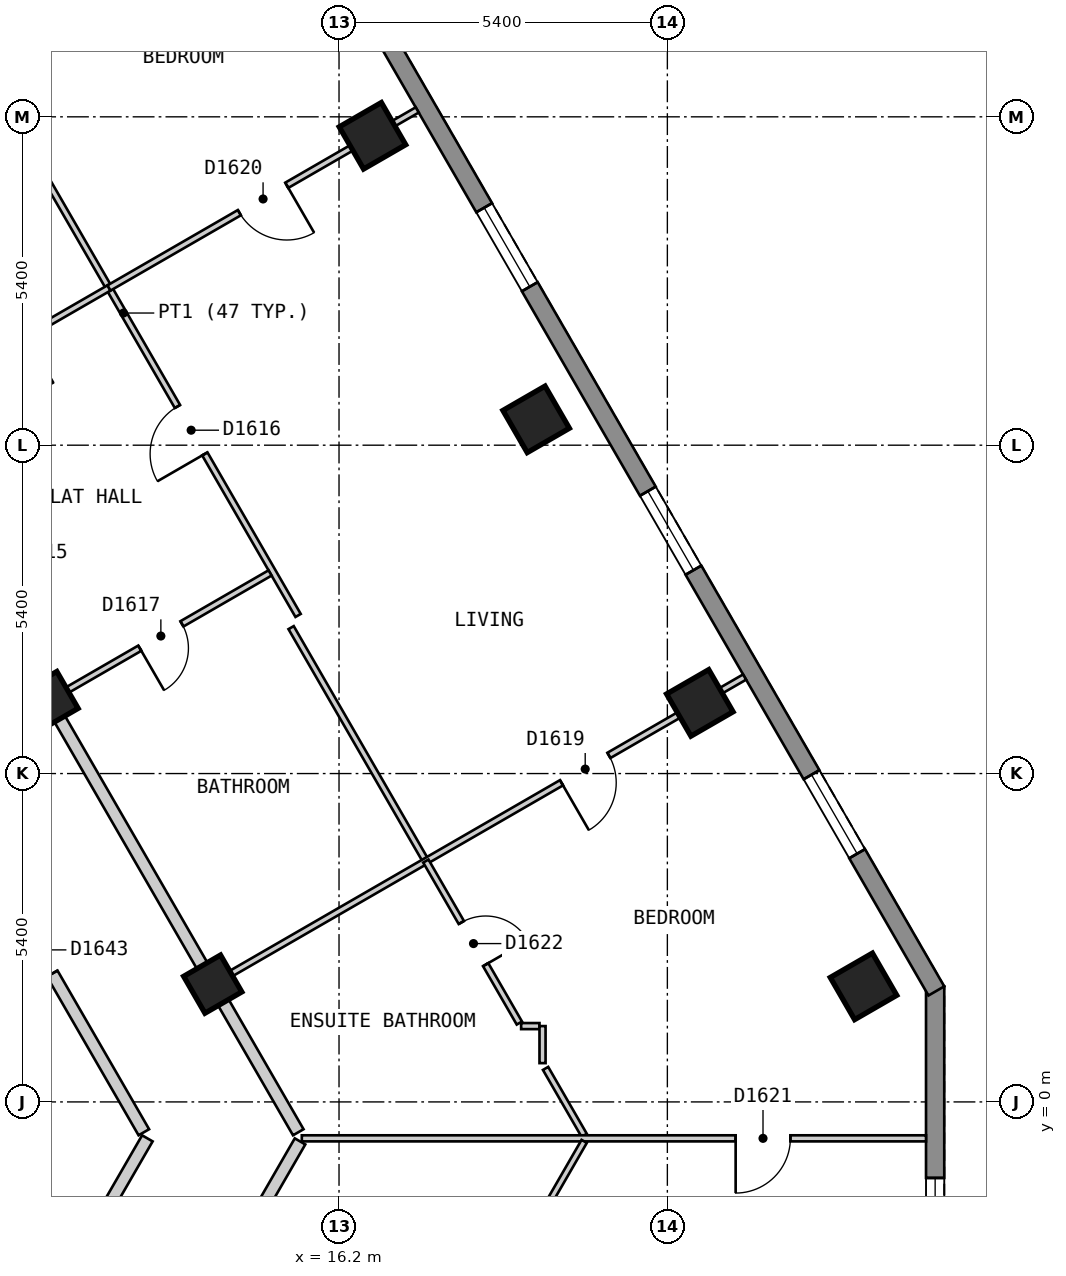
"""IFC4 building model, lengths in metres.
Left out: names, types, materials, properties, quantities, classifications, styles, units other than length and angle.
Written with IfcOpenShell. Run it as: python <this file> out.ifc"""

import sys

from ifc_helpers import new_model, si_unit, direction, frame, frame_2d, origin, origin_2d, place, context, subcontext, project, spatial, polyline, rectangle, outline, extrude, element, fill, save


model = new_model("IFC4")
c1 = context("Model", 3, precision=1e-05, world=origin(), true_north=direction((0.0, 1.0)))
c2 = subcontext(c1, "Body", "Model", "MODEL_VIEW")
j1 = project(units=[si_unit("LENGTHUNIT", "METRE"), si_unit("PLANEANGLEUNIT", "RADIAN")], contexts=[c1])
p1 = place(None, origin())
s1 = spatial("IfcSite", under=j1, at=p1, CompositionType="ELEMENT")
p2 = place(p1, origin())
s2 = spatial("IfcBuilding", under=s1, at=p2, CompositionType="ELEMENT")
p3 = place(p2, frame((0.0, 0.0, 163.2)))
s3 = spatial("IfcBuildingStorey", under=s2, at=p3, CompositionType="ELEMENT", Elevation=163.2)
for number, where, z_axis, x_axis in (
    (1, (24.826, 1.9, 0.0), (0.0, 0.0, 1.0), (-0.5, 0.866, 0.0)),
    (2, (22.134, 6.562, 0.0), (0.0, 0.0, 1.0), (-0.5, 0.866, 0.0)),
    (3, (19.442, 11.225, 0.0), (0.0, 0.0, 1.0), (-0.5, 0.866, 0.0)),
    (4, (16.75, 15.888, 0.0), (0.0, 0.0, 1.0), (-0.5, 0.866, 0.0)),
):
    element("IfcColumn", number, at=place(p3, frame(where, z_axis=z_axis, x_axis=x_axis)), inside=s3, PredefinedType="COLUMN", context=c2, shape_type="SweptSolid", body=[
        extrude(rectangle(XDim=0.8, YDim=0.8, at=origin_2d()), origin(), (0.0, 0.0, 1.0), 3.0),
    ])
for number, where, z_axis, x_axis in (
    (5, (14.123, 1.937, 0.0), (0.0, 0.0, 1.0), (-0.5, 0.866, 0.0)),
    (6, (11.431, 6.6, 0.0), (0.0, 0.0, 1.0), (-0.5, 0.866, 0.0)),
):
    element("IfcColumn", number, at=place(p3, frame(where, z_axis=z_axis, x_axis=x_axis)), inside=s3, PredefinedType="COLUMN", context=c2, shape_type="SweptSolid", body=[
        extrude(rectangle(XDim=0.7, YDim=0.7, at=origin_2d()), origin(), (0.0, 0.0, 1.0), 3.0),
    ])
p4 = place(p3, frame((26.004, -3.1, 0.0), z_axis=(0.0, 0.0, 1.0), x_axis=(0.0, 1.0, 0.0)))
e7 = element("IfcWall", 7, at=p4, inside=s3, PredefinedType="SOLIDWALL", context=c2, shape_type="SweptSolid", body=[
    extrude(outline(polyline([(0.0, -0.15), (5.0, -0.15), (4.92, 0.15), (0.08, 0.15), (0.0, -0.15)])), origin(), (0.0, 0.0, 1.0), 2.7),
])
p5 = place(p4, frame((0.65, 0.0, 0.15)))
e8 = element("IfcOpeningElement", 8, at=p5, cuts=e7, PredefinedType="OPENING", context=c2, shape_type="SweptSolid", body=[
    extrude(rectangle(XDim=1.2, YDim=2.1, at=frame_2d((0.6, 1.05))), frame((0.0, 0.16, 0.0), z_axis=(0.0, -1.0, 0.0), x_axis=(1.0, 0.0, 0.0)), (0.0, 0.0, 1.0), 0.32),
])
p6 = place(p3, frame((26.024, 1.825, 0.0), z_axis=(0.0, 0.0, 1.0), x_axis=(-0.500010537973, 0.866019319597, 0.0)))
e9 = element("IfcWall", 9, at=p6, inside=s3, PredefinedType="SOLIDWALL", context=c2, shape_type="SweptSolid", body=[
    extrude(outline(polyline([(0.0, -0.15), (22.863, -0.15), (22.783, 0.15), (0.08, 0.15), (0.0, -0.15)])), origin(), (0.0, 0.0, 1.0), 2.7),
])
p7 = place(p6, frame((2.606, 0.0, 0.15)))
e10 = element("IfcOpeningElement", 10, at=p7, cuts=e9, PredefinedType="OPENING", context=c2, shape_type="SweptSolid", body=[
    extrude(rectangle(XDim=1.5, YDim=2.1, at=frame_2d((0.75, 1.05))), frame((0.0, 0.16, 0.0), z_axis=(0.0, -1.0, 0.0), x_axis=(1.0, 0.0, 0.0)), (0.0, 0.0, 1.0), 0.32),
])
p8 = place(p6, frame((7.99, 0.0, 0.15)))
e11 = element("IfcOpeningElement", 11, at=p8, cuts=e9, PredefinedType="OPENING", context=c2, shape_type="SweptSolid", body=[
    extrude(rectangle(XDim=1.5, YDim=2.1, at=frame_2d((0.75, 1.05))), frame((0.0, 0.16, 0.0), z_axis=(0.0, -1.0, 0.0), x_axis=(1.0, 0.0, 0.0)), (0.0, 0.0, 1.0), 0.32),
])
p9 = place(p6, frame((13.373, 0.0, 0.15)))
e12 = element("IfcOpeningElement", 12, at=p9, cuts=e9, PredefinedType="OPENING", context=c2, shape_type="SweptSolid", body=[
    extrude(rectangle(XDim=1.5, YDim=2.1, at=frame_2d((0.75, 1.05))), frame((0.0, 0.16, 0.0), z_axis=(0.0, -1.0, 0.0), x_axis=(1.0, 0.0, 0.0)), (0.0, 0.0, 1.0), 0.32),
])
p10 = place(p6, frame((18.758, 0.0, 0.15)))
e13 = element("IfcOpeningElement", 13, at=p10, cuts=e9, PredefinedType="OPENING", context=c2, shape_type="SweptSolid", body=[
    extrude(rectangle(XDim=1.5, YDim=2.1, at=frame_2d((0.75, 1.05))), frame((0.0, 0.16, 0.0), z_axis=(0.0, -1.0, 0.0), x_axis=(1.0, 0.0, 0.0)), (0.0, 0.0, 1.0), 0.32),
])
p11 = place(p3, frame((9.526, 5.5, 0.0), z_axis=(0.0, 0.0, 1.0), x_axis=(0.500062092869, -0.865989551482, 0.0)))
e14 = element("IfcWall", 14, at=p11, inside=s3, PredefinedType="PARTITIONING", context=c2, shape_type="SweptSolid", body=[
    extrude(rectangle(XDim=6.927, YDim=0.2, at=frame_2d((3.464, 0.0))), origin(), (0.0, 0.0, 1.0), 2.7),
])
p12 = place(p11, frame((3.014, 0.0, 0.0)))
e15 = element("IfcOpeningElement", 15, at=p12, cuts=e14, PredefinedType="OPENING", context=c2, shape_type="SweptSolid", body=[
    extrude(rectangle(XDim=0.9, YDim=2.1, at=frame_2d((0.45, 1.05))), frame((0.0, 0.11, 0.0), z_axis=(0.0, -1.0, 0.0), x_axis=(1.0, 0.0, 0.0)), (0.0, 0.0, 1.0), 0.22),
])
p13 = place(p3, frame((10.739, 7.8, 0.0), z_axis=(0.0, 0.0, 1.0), x_axis=(0.499964311759, -0.86604600742, 0.0)))
e16 = element("IfcWall", 16, at=p13, inside=s3, PredefinedType="PARTITIONING", context=c2, shape_type="SweptSolid", body=[
    extrude(rectangle(XDim=9.583, YDim=0.2, at=frame_2d((4.792, 0.0))), origin(), (0.0, 0.0, 1.0), 2.7),
])
p14 = place(p3, frame((11.777, -2.8, 0.0), z_axis=(0.0, 0.0, 1.0), x_axis=(0.500085537782, 0.86597601289, 0.0)))
e17 = element("IfcWall", 17, at=p14, inside=s3, PredefinedType="PARTITIONING", context=c2, shape_type="SweptSolid", body=[
    extrude(rectangle(XDim=2.542, YDim=0.2, at=frame_2d((1.271, 0.0))), origin(), (0.0, 0.0, 1.0), 2.7),
])
p15 = place(p3, frame((14.318, -2.8, 0.0), z_axis=(0.0, 0.0, 1.0), x_axis=(0.49970259524, 0.866197042428, 0.0)))
e18 = element("IfcWall", 18, at=p15, inside=s3, PredefinedType="PARTITIONING", context=c2, shape_type="SweptSolid", body=[
    extrude(rectangle(XDim=2.483, YDim=0.2, at=frame_2d((1.242, 0.0))), origin(), (0.0, 0.0, 1.0), 2.7),
])
p16 = place(p3, frame((15.412, 7.8, 0.0), z_axis=(0.0, 0.0, 1.0), x_axis=(0.499882970317, -0.866092960361, 0.0)))
e19 = element("IfcWall", 19, at=p16, inside=s3, PredefinedType="PARTITIONING", context=c2, shape_type="SweptSolid", body=[
    extrude(rectangle(XDim=4.433, YDim=0.1, at=frame_2d((2.216, 0.0))), origin(), (0.0, 0.0, 1.0), 2.7),
])
p17 = place(p3, frame((19.597, 0.551, 0.0), z_axis=(0.0, 0.0, 1.0), x_axis=(0.499922110319, -0.866070368743, 0.0)))
e20 = element("IfcWall", 20, at=p17, inside=s3, PredefinedType="PARTITIONING", context=c2, shape_type="SweptSolid", body=[
    extrude(rectangle(XDim=1.27, YDim=0.1, at=frame_2d((0.635, 0.0))), origin(), (0.0, 0.0, 1.0), 2.7),
])
p18 = place(p3, frame((9.784, 17.947, 0.0), z_axis=(0.0, 0.0, 1.0), x_axis=(0.500016228266, -0.866016034188, 0.0)))
e21 = element("IfcWall", 21, at=p18, inside=s3, PredefinedType="PARTITIONING", context=c2, shape_type="SweptSolid", body=[
    extrude(rectangle(XDim=11.486, YDim=0.1, at=frame_2d((5.743, 0.0))), origin(), (0.0, 0.0, 1.0), 2.7),
])
p19 = place(p18, frame((7.518, 0.0, 0.0)))
e22 = element("IfcOpeningElement", 22, at=p19, cuts=e21, PredefinedType="OPENING", context=c2, shape_type="SweptSolid", body=[
    extrude(rectangle(XDim=0.9, YDim=2.1, at=frame_2d((0.45, 1.05))), frame((0.0, 0.06, 0.0), z_axis=(0.0, -1.0, 0.0), x_axis=(1.0, 0.0, 0.0)), (0.0, 0.0, 1.0), 0.12),
])
p20 = place(p3, frame((15.588, -0.599, 0.0), z_axis=(0.0, 0.0, 1.0), x_axis=(1.0, 0.0, 0.0)))
e23 = element("IfcWall", 23, at=p20, inside=s3, PredefinedType="PARTITIONING", context=c2, shape_type="SweptSolid", body=[
    extrude(rectangle(XDim=10.266, YDim=0.1, at=frame_2d((5.133, 0.0))), origin(), (0.0, 0.0, 1.0), 2.7),
])
p21 = place(p20, frame((7.135, 0.0, 0.0)))
e24 = element("IfcOpeningElement", 24, at=p21, cuts=e23, PredefinedType="OPENING", context=c2, shape_type="SweptSolid", body=[
    extrude(rectangle(XDim=0.9, YDim=2.1, at=frame_2d((0.45, 1.05))), frame((0.0, 0.06, 0.0), z_axis=(0.0, -1.0, 0.0), x_axis=(1.0, 0.0, 0.0)), (0.0, 0.0, 1.0), 0.12),
])
p22 = place(p3, frame((19.195, 1.247, 0.0), z_axis=(0.0, 0.0, 1.0), x_axis=(1.0, 0.0, 0.0)))
e25 = element("IfcWall", 25, at=p22, inside=s3, PredefinedType="PARTITIONING", context=c2, shape_type="SweptSolid", body=[
    extrude(rectangle(XDim=0.302, YDim=0.1, at=frame_2d((0.151, 0.0))), origin(), (0.0, 0.0, 1.0), 2.7),
])
p23 = place(p3, frame((19.597, -1.75, 0.0), z_axis=(0.0, 0.0, 1.0), x_axis=(0.499589422776, 0.866262320923, 0.0)))
e26 = element("IfcWall", 26, at=p23, inside=s3, PredefinedType="PARTITIONING", context=c2, shape_type="SweptSolid", body=[
    extrude(rectangle(XDim=1.271, YDim=0.1, at=frame_2d((0.635, 0.0))), origin(), (0.0, 0.0, 1.0), 2.7),
])
p24 = place(p3, frame((19.547, 0.638, 0.0), z_axis=(0.0, 0.0, 1.0), x_axis=(0.0, 1.0, 0.0)))
e27 = element("IfcWall", 27, at=p24, inside=s3, PredefinedType="PARTITIONING", context=c2, shape_type="SweptSolid", body=[
    extrude(rectangle(XDim=0.609, YDim=0.1, at=frame_2d((0.305, 0.0))), origin(), (0.0, 0.0, 1.0), 2.7),
])
p25 = place(p3, frame((14.21, 1.987, 0.0), z_axis=(0.0, 0.0, 1.0), x_axis=(0.866022959057, 0.500004234368, 0.0)))
e28 = element("IfcWall", 28, at=p25, inside=s3, PredefinedType="PARTITIONING", context=c2, shape_type="SweptSolid", body=[
    extrude(rectangle(XDim=10.0, YDim=0.1, at=frame_2d((5.0, 0.0))), origin(), (0.0, 0.0, 1.0), 2.7),
])
p26 = place(p25, frame((6.523, 0.0, 0.0)))
e29 = element("IfcOpeningElement", 29, at=p26, cuts=e28, PredefinedType="OPENING", context=c2, shape_type="SweptSolid", body=[
    extrude(rectangle(XDim=0.9, YDim=2.1, at=frame_2d((0.45, 1.05))), frame((0.0, 0.06, 0.0), z_axis=(0.0, -1.0, 0.0), x_axis=(1.0, 0.0, 0.0)), (0.0, 0.0, 1.0), 0.12),
])
p27 = place(p3, frame((11.518, 6.65, 0.0), z_axis=(0.0, 0.0, 1.0), x_axis=(0.865949381454, 0.500131651427, 0.0)))
e30 = element("IfcWall", 30, at=p27, inside=s3, PredefinedType="PARTITIONING", context=c2, shape_type="SweptSolid", body=[
    extrude(rectangle(XDim=4.097, YDim=0.1, at=frame_2d((2.049, 0.0))), origin(), (0.0, 0.0, 1.0), 2.7),
])
p28 = place(p27, frame((1.623, 0.0, 0.0)))
e31 = element("IfcOpeningElement", 31, at=p28, cuts=e30, PredefinedType="OPENING", context=c2, shape_type="SweptSolid", body=[
    extrude(rectangle(XDim=0.8, YDim=2.1, at=frame_2d((0.4, 1.05))), frame((0.0, 0.06, 0.0), z_axis=(0.0, -1.0, 0.0), x_axis=(1.0, 0.0, 0.0)), (0.0, 0.0, 1.0), 0.12),
])
p29 = place(p3, frame((8.999, 11.413, 0.0), z_axis=(0.0, 0.0, 1.0), x_axis=(0.866076396086, 0.499911668341, 0.0)))
e32 = element("IfcWall", 32, at=p29, inside=s3, PredefinedType="PARTITIONING", context=c2, shape_type="SweptSolid", body=[
    extrude(rectangle(XDim=3.947, YDim=0.1, at=frame_2d((1.973, 0.0))), origin(), (0.0, 0.0, 1.0), 2.7),
])
p30 = place(p29, frame((1.474, 0.0, 0.0)))
e33 = element("IfcOpeningElement", 33, at=p30, cuts=e32, PredefinedType="OPENING", context=c2, shape_type="SweptSolid", body=[
    extrude(rectangle(XDim=0.9, YDim=2.1, at=frame_2d((0.45, 1.05))), frame((0.0, 0.06, 0.0), z_axis=(0.0, -1.0, 0.0), x_axis=(1.0, 0.0, 0.0)), (0.0, 0.0, 1.0), 0.12),
])
p31 = place(p3, frame((17.628, 3.961, 0.0), z_axis=(0.0, 0.0, 1.0), x_axis=(0.50003162148, -0.866007146345, 0.0)))
e34 = element("IfcWall", 34, at=p31, inside=s3, PredefinedType="PARTITIONING", context=c2, shape_type="SweptSolid", body=[
    extrude(rectangle(XDim=3.076, YDim=0.1, at=frame_2d((1.538, 0.0))), origin(), (0.0, 0.0, 1.0), 2.7),
])
p32 = place(p31, frame((1.167, 0.0, 0.0)))
e35 = element("IfcOpeningElement", 35, at=p32, cuts=e34, PredefinedType="OPENING", context=c2, shape_type="SweptSolid", body=[
    extrude(rectangle(XDim=0.8, YDim=2.1, at=frame_2d((0.4, 1.05))), frame((0.0, 0.06, 0.0), z_axis=(0.0, -1.0, 0.0), x_axis=(1.0, 0.0, 0.0)), (0.0, 0.0, 1.0), 0.12),
])
p33 = place(p3, frame((12.417, 13.386, 0.0), z_axis=(0.0, 0.0, 1.0), x_axis=(0.86599873886, 0.50004618216, 0.0)))
e36 = element("IfcWall", 36, at=p33, inside=s3, PredefinedType="PARTITIONING", context=c2, shape_type="SweptSolid", body=[
    extrude(rectangle(XDim=5.854, YDim=0.1, at=frame_2d((2.927, 0.0))), origin(), (0.0, 0.0, 1.0), 2.7),
])
p34 = place(p33, frame((2.476, 0.0, 0.0)))
e37 = element("IfcOpeningElement", 37, at=p34, cuts=e36, PredefinedType="OPENING", context=c2, shape_type="SweptSolid", body=[
    extrude(rectangle(XDim=0.9, YDim=2.1, at=frame_2d((0.45, 1.05))), frame((0.0, 0.06, 0.0), z_axis=(0.0, -1.0, 0.0), x_axis=(1.0, 0.0, 0.0)), (0.0, 0.0, 1.0), 0.12),
])
p35 = place(p5, origin())
e38 = element("IfcWindow", 38, at=p35, inside=s3, PartitioningType="SINGLE_PANEL", PredefinedType="WINDOW", context=c2, shape_type="SweptSolid", body=[
    extrude(rectangle(XDim=1.2, YDim=2.1, at=frame_2d((0.6, 1.05))), frame((0.0, 0.03, 0.0), z_axis=(0.0, -1.0, 0.0), x_axis=(1.0, 0.0, 0.0)), (0.0, 0.0, 1.0), 0.06),
])
fill(e8, e38)
p36 = place(p7, origin())
e39 = element("IfcWindow", 39, at=p36, inside=s3, PartitioningType="SINGLE_PANEL", PredefinedType="WINDOW", context=c2, shape_type="SweptSolid", body=[
    extrude(rectangle(XDim=1.5, YDim=2.1, at=frame_2d((0.75, 1.05))), frame((0.0, 0.03, 0.0), z_axis=(0.0, -1.0, 0.0), x_axis=(1.0, 0.0, 0.0)), (0.0, 0.0, 1.0), 0.06),
])
fill(e10, e39)
p37 = place(p8, origin())
e40 = element("IfcWindow", 40, at=p37, inside=s3, PartitioningType="SINGLE_PANEL", PredefinedType="WINDOW", context=c2, shape_type="SweptSolid", body=[
    extrude(rectangle(XDim=1.5, YDim=2.1, at=frame_2d((0.75, 1.05))), frame((0.0, 0.03, 0.0), z_axis=(0.0, -1.0, 0.0), x_axis=(1.0, 0.0, 0.0)), (0.0, 0.0, 1.0), 0.06),
])
fill(e11, e40)
p38 = place(p9, origin())
e41 = element("IfcWindow", 41, at=p38, inside=s3, PartitioningType="SINGLE_PANEL", PredefinedType="WINDOW", context=c2, shape_type="SweptSolid", body=[
    extrude(rectangle(XDim=1.5, YDim=2.1, at=frame_2d((0.75, 1.05))), frame((0.0, 0.03, 0.0), z_axis=(0.0, -1.0, 0.0), x_axis=(1.0, 0.0, 0.0)), (0.0, 0.0, 1.0), 0.06),
])
fill(e12, e41)
p39 = place(p19, origin())
e42 = element("IfcDoor", 42, at=p39, inside=s3, OperationType="SINGLE_SWING_RIGHT", PredefinedType="DOOR", context=c2, shape_type="SweptSolid", body=[
    extrude(rectangle(XDim=0.9, YDim=2.1, at=frame_2d((0.45, 1.05))), frame((0.0, 0.025, 0.0), z_axis=(0.0, -1.0, 0.0), x_axis=(1.0, 0.0, 0.0)), (0.0, 0.0, 1.0), 0.05),
])
fill(e22, e42)
p40 = place(p28, origin())
e43 = element("IfcDoor", 43, at=p40, inside=s3, OperationType="SINGLE_SWING_LEFT", PredefinedType="DOOR", context=c2, shape_type="SweptSolid", body=[
    extrude(rectangle(XDim=0.8, YDim=2.1, at=frame_2d((0.4, 1.05))), frame((0.0, 0.025, 0.0), z_axis=(0.0, -1.0, 0.0), x_axis=(1.0, 0.0, 0.0)), (0.0, 0.0, 1.0), 0.05),
])
fill(e31, e43)
p41 = place(p26, origin())
e44 = element("IfcDoor", 44, at=p41, inside=s3, OperationType="SINGLE_SWING_LEFT", PredefinedType="DOOR", context=c2, shape_type="SweptSolid", body=[
    extrude(rectangle(XDim=0.9, YDim=2.1, at=frame_2d((0.45, 1.05))), frame((0.0, 0.025, 0.0), z_axis=(0.0, -1.0, 0.0), x_axis=(1.0, 0.0, 0.0)), (0.0, 0.0, 1.0), 0.05),
])
fill(e29, e44)
p42 = place(p34, origin())
e45 = element("IfcDoor", 45, at=p42, inside=s3, OperationType="SINGLE_SWING_RIGHT", PredefinedType="DOOR", context=c2, shape_type="SweptSolid", body=[
    extrude(rectangle(XDim=0.9, YDim=2.1, at=frame_2d((0.45, 1.05))), frame((0.0, 0.025, 0.0), z_axis=(0.0, -1.0, 0.0), x_axis=(1.0, 0.0, 0.0)), (0.0, 0.0, 1.0), 0.05),
])
fill(e37, e45)
p43 = place(p21, origin())
e46 = element("IfcDoor", 46, at=p43, inside=s3, OperationType="SINGLE_SWING_LEFT", PredefinedType="DOOR", context=c2, shape_type="SweptSolid", body=[
    extrude(rectangle(XDim=0.9, YDim=2.1, at=frame_2d((0.45, 1.05))), frame((0.0, 0.025, 0.0), z_axis=(0.0, -1.0, 0.0), x_axis=(1.0, 0.0, 0.0)), (0.0, 0.0, 1.0), 0.05),
])
fill(e24, e46)
p44 = place(p32, origin())
e47 = element("IfcDoor", 47, at=p44, inside=s3, OperationType="SINGLE_SWING_RIGHT", PredefinedType="DOOR", context=c2, shape_type="SweptSolid", body=[
    extrude(rectangle(XDim=0.8, YDim=2.1, at=frame_2d((0.4, 1.05))), frame((0.0, 0.025, 0.0), z_axis=(0.0, -1.0, 0.0), x_axis=(1.0, 0.0, 0.0)), (0.0, 0.0, 1.0), 0.05),
])
fill(e35, e47)
p45 = place(p12, origin())
e48 = element("IfcDoor", 48, at=p45, inside=s3, OperationType="SINGLE_SWING_LEFT", PredefinedType="DOOR", context=c2, shape_type="SweptSolid", body=[
    extrude(rectangle(XDim=0.9, YDim=2.1, at=frame_2d((0.45, 1.05))), frame((0.0, 0.025, 0.0), z_axis=(0.0, -1.0, 0.0), x_axis=(1.0, 0.0, 0.0)), (0.0, 0.0, 1.0), 0.05),
])
fill(e15, e48)
save(model, sys.argv[1])
